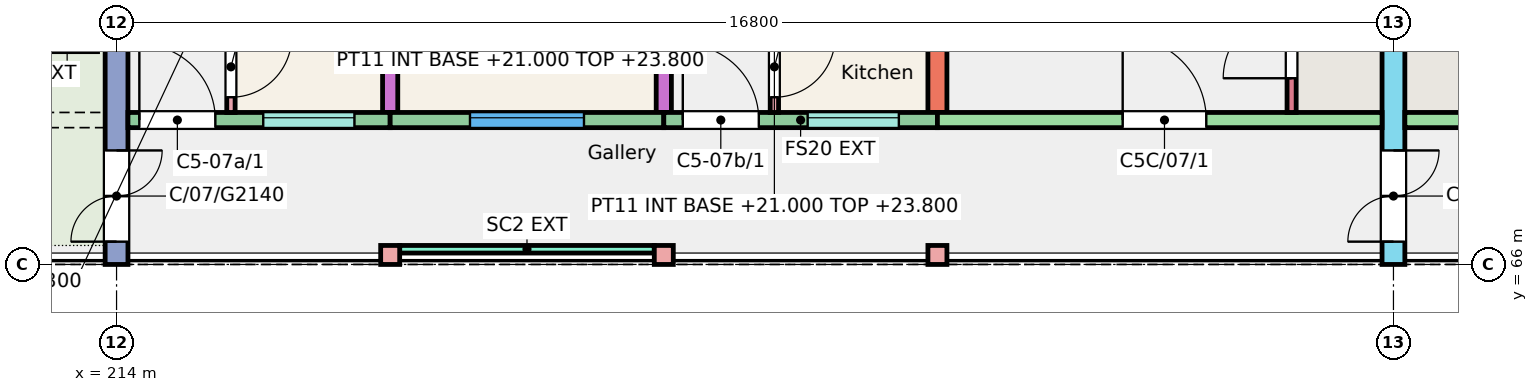
"""IFC4 building model, lengths in metres.
Left out: names, types, materials, properties, quantities, classifications, styles, units other than length and angle.
Written with IfcOpenShell. Run it as: python <this file> out.ifc"""

import sys

from ifc_helpers import new_model, si_unit, direction, frame, frame_2d, origin, origin_2d, place, context, subcontext, project, spatial, rectangle, extrude, element, fill, save


model = new_model("IFC4")
c1 = context("Model", 3, precision=1e-05, world=origin(), true_north=direction((0.0, 1.0)))
c2 = subcontext(c1, "Body", "Model", "MODEL_VIEW")
j1 = project(units=[si_unit("LENGTHUNIT", "METRE"), si_unit("PLANEANGLEUNIT", "RADIAN")], contexts=[c1])
p1 = place(None, origin())
s1 = spatial("IfcSite", under=j1, at=p1, CompositionType="ELEMENT")
p2 = place(p1, origin())
s2 = spatial("IfcBuilding", under=s1, at=p2, CompositionType="ELEMENT")
p3 = place(p2, frame((0.0, 0.0, 21.0)))
s3 = spatial("IfcBuildingStorey", under=s2, at=p3, CompositionType="ELEMENT", Elevation=21.0)
p4 = place(p3, frame((214.0, 66.0, 0.0), z_axis=(0.0, 0.0, 1.0), x_axis=(0.0, 1.0, 0.0)))
e1 = element("IfcWall", 1, at=p4, inside=s3, PredefinedType="SHEAR", context=c2, shape_type="SweptSolid", body=[
    extrude(rectangle(XDim=11.0, YDim=0.3, at=frame_2d((5.5, 0.0))), origin(), (0.0, 0.0, 1.0), 3.0),
])
p5 = place(p4, frame((0.3, 0.0, 0.0)))
e2 = element("IfcOpeningElement", 2, at=p5, cuts=e1, PredefinedType="OPENING", context=c2, shape_type="SweptSolid", body=[
    extrude(rectangle(XDim=1.2, YDim=2.1, at=frame_2d((0.6, 1.05))), frame((0.0, 0.16, 0.0), z_axis=(0.0, -1.0, 0.0), x_axis=(1.0, 0.0, 0.0)), (0.0, 0.0, 1.0), 0.32),
])
p6 = place(p3, frame((217.6, 68.0, 0.0), z_axis=(0.0, 0.0, 1.0), x_axis=(0.0, 1.0, 0.0)))
e3 = element("IfcWall", 3, at=p6, inside=s3, PredefinedType="SHEAR", context=c2, shape_type="SweptSolid", body=[
    extrude(rectangle(XDim=9.0, YDim=0.2, at=frame_2d((4.5, 0.0))), origin(), (0.0, 0.0, 1.0), 3.0),
])
p7 = place(p3, frame((221.2, 68.0, 0.0), z_axis=(0.0, 0.0, 1.0), x_axis=(0.0, 1.0, 0.0)))
e4 = element("IfcWall", 4, at=p7, inside=s3, PredefinedType="SHEAR", context=c2, shape_type="SweptSolid", body=[
    extrude(rectangle(XDim=9.0, YDim=0.2, at=frame_2d((4.5, 0.0))), origin(), (0.0, 0.0, 1.0), 3.0),
])
p8 = place(p7, frame((2.4, 0.0, 0.0)))
e5 = element("IfcOpeningElement", 5, at=p8, cuts=e4, PredefinedType="OPENING", context=c2, shape_type="SweptSolid", body=[
    extrude(rectangle(XDim=1.2, YDim=2.1, at=frame_2d((0.6, 1.05))), frame((0.0, 0.11, 0.0), z_axis=(0.0, -1.0, 0.0), x_axis=(1.0, 0.0, 0.0)), (0.0, 0.0, 1.0), 0.22),
])
p9 = place(p7, frame((6.4, 0.0, 0.0)))
e6 = element("IfcOpeningElement", 6, at=p9, cuts=e4, PredefinedType="OPENING", context=c2, shape_type="SweptSolid", body=[
    extrude(rectangle(XDim=1.2, YDim=2.1, at=frame_2d((0.6, 1.05))), frame((0.0, 0.11, 0.0), z_axis=(0.0, -1.0, 0.0), x_axis=(1.0, 0.0, 0.0)), (0.0, 0.0, 1.0), 0.22),
])
p10 = place(p3, frame((224.8, 68.0, 0.0), z_axis=(0.0, 0.0, 1.0), x_axis=(0.0, 1.0, 0.0)))
e7 = element("IfcWall", 7, at=p10, inside=s3, PredefinedType="SHEAR", context=c2, shape_type="SweptSolid", body=[
    extrude(rectangle(XDim=9.0, YDim=0.25, at=frame_2d((4.5, 0.0))), origin(), (0.0, 0.0, 1.0), 3.0),
])
p11 = place(p3, frame((230.8, 66.0, 0.0), z_axis=(0.0, 0.0, 1.0), x_axis=(0.0, 1.0, 0.0)))
e8 = element("IfcWall", 8, at=p11, inside=s3, PredefinedType="SHEAR", context=c2, shape_type="SweptSolid", body=[
    extrude(rectangle(XDim=11.0, YDim=0.3, at=frame_2d((5.5, 0.0))), origin(), (0.0, 0.0, 1.0), 3.0),
])
p12 = place(p11, frame((0.3, 0.0, 0.0)))
e9 = element("IfcOpeningElement", 9, at=p12, cuts=e8, PredefinedType="OPENING", context=c2, shape_type="SweptSolid", body=[
    extrude(rectangle(XDim=1.2, YDim=2.1, at=frame_2d((0.6, 1.05))), frame((0.0, 0.16, 0.0), z_axis=(0.0, -1.0, 0.0), x_axis=(1.0, 0.0, 0.0)), (0.0, 0.0, 1.0), 0.32),
])
p13 = place(p3, frame((214.15, 67.9, 0.0), z_axis=(0.0, 0.0, 1.0), x_axis=(1.0, 0.0, 0.0)))
e10 = element("IfcWall", 10, at=p13, inside=s3, PredefinedType="SOLIDWALL", context=c2, shape_type="SweptSolid", body=[
    extrude(rectangle(XDim=3.45, YDim=0.2, at=frame_2d((1.725, 0.0))), origin(), (0.0, 0.0, 1.0), 3.0),
])
p14 = place(p13, frame((1.78, 0.0, 1.1)))
e11 = element("IfcOpeningElement", 11, at=p14, cuts=e10, PredefinedType="OPENING", context=c2, shape_type="SweptSolid", body=[
    extrude(rectangle(XDim=1.2, YDim=1.3, at=frame_2d((0.6, 0.65))), frame((0.0, 0.11, 0.0), z_axis=(0.0, -1.0, 0.0), x_axis=(1.0, 0.0, 0.0)), (0.0, 0.0, 1.0), 0.22),
])
p15 = place(p13, frame((0.15, 0.0, 0.0)))
e12 = element("IfcOpeningElement", 12, at=p15, cuts=e10, PredefinedType="OPENING", context=c2, shape_type="SweptSolid", body=[
    extrude(rectangle(XDim=1.0, YDim=2.1, at=frame_2d((0.5, 1.05))), frame((0.0, 0.11, 0.0), z_axis=(0.0, -1.0, 0.0), x_axis=(1.0, 0.0, 0.0)), (0.0, 0.0, 1.0), 0.22),
])
p16 = place(p3, frame((217.6, 67.9, 0.0), z_axis=(0.0, 0.0, 1.0), x_axis=(1.0, 0.0, 0.0)))
e13 = element("IfcWall", 13, at=p16, inside=s3, PredefinedType="SOLIDWALL", context=c2, shape_type="SweptSolid", body=[
    extrude(rectangle(XDim=3.6, YDim=0.2, at=frame_2d((1.8, 0.0))), origin(), (0.0, 0.0, 1.0), 3.0),
])
p17 = place(p16, frame((1.05, 0.0, 0.9)))
e14 = element("IfcOpeningElement", 14, at=p17, cuts=e13, PredefinedType="OPENING", context=c2, shape_type="SweptSolid", body=[
    extrude(rectangle(XDim=1.5, YDim=1.5, at=frame_2d((0.75, 0.75))), frame((0.0, 0.11, 0.0), z_axis=(0.0, -1.0, 0.0), x_axis=(1.0, 0.0, 0.0)), (0.0, 0.0, 1.0), 0.22),
])
p18 = place(p3, frame((221.2, 67.9, 0.0), z_axis=(0.0, 0.0, 1.0), x_axis=(1.0, 0.0, 0.0)))
e15 = element("IfcWall", 15, at=p18, inside=s3, PredefinedType="SOLIDWALL", context=c2, shape_type="SweptSolid", body=[
    extrude(rectangle(XDim=3.6, YDim=0.2, at=frame_2d((1.8, 0.0))), origin(), (0.0, 0.0, 1.0), 3.0),
])
p19 = place(p18, frame((1.893, 0.0, 1.1)))
e16 = element("IfcOpeningElement", 16, at=p19, cuts=e15, PredefinedType="OPENING", context=c2, shape_type="SweptSolid", body=[
    extrude(rectangle(XDim=1.2, YDim=1.3, at=frame_2d((0.6, 0.65))), frame((0.0, 0.11, 0.0), z_axis=(0.0, -1.0, 0.0), x_axis=(1.0, 0.0, 0.0)), (0.0, 0.0, 1.0), 0.22),
])
p20 = place(p18, frame((0.25, 0.0, 0.0)))
e17 = element("IfcOpeningElement", 17, at=p20, cuts=e15, PredefinedType="OPENING", context=c2, shape_type="SweptSolid", body=[
    extrude(rectangle(XDim=1.0, YDim=2.1, at=frame_2d((0.5, 1.05))), frame((0.0, 0.11, 0.0), z_axis=(0.0, -1.0, 0.0), x_axis=(1.0, 0.0, 0.0)), (0.0, 0.0, 1.0), 0.22),
])
p21 = place(p3, frame((224.8, 67.9, 0.0), z_axis=(0.0, 0.0, 1.0), x_axis=(1.0, 0.0, 0.0)))
e18 = element("IfcWall", 18, at=p21, inside=s3, PredefinedType="SHEAR", context=c2, shape_type="SweptSolid", body=[
    extrude(rectangle(XDim=5.85, YDim=0.2, at=frame_2d((2.925, 0.0))), origin(), (0.0, 0.0, 1.0), 3.0),
])
p22 = place(p21, frame((2.438, 0.0, 0.0)))
e19 = element("IfcOpeningElement", 19, at=p22, cuts=e18, PredefinedType="OPENING", context=c2, shape_type="SweptSolid", body=[
    extrude(rectangle(XDim=1.1, YDim=2.1, at=frame_2d((0.55, 1.05))), frame((0.0, 0.11, 0.0), z_axis=(0.0, -1.0, 0.0), x_axis=(1.0, 0.0, 0.0)), (0.0, 0.0, 1.0), 0.22),
])
p23 = place(p3, frame((229.46, 68.0, 0.0), z_axis=(0.0, 0.0, 1.0), x_axis=(0.0, 1.0, 0.0)))
e20 = element("IfcWall", 20, at=p23, inside=s3, PredefinedType="SHEAR", context=c2, shape_type="SweptSolid", body=[
    extrude(rectangle(XDim=1.72, YDim=0.12, at=frame_2d((0.86, 0.0))), origin(), (0.0, 0.0, 1.0), 3.0),
])
p24 = place(p23, frame((0.45, 0.0, 0.0)))
e21 = element("IfcOpeningElement", 21, at=p24, cuts=e20, PredefinedType="OPENING", context=c2, shape_type="SweptSolid", body=[
    extrude(rectangle(XDim=0.9, YDim=2.1, at=frame_2d((0.45, 1.05))), frame((0.0, 0.07, 0.0), z_axis=(0.0, -1.0, 0.0), x_axis=(1.0, 0.0, 0.0)), (0.0, 0.0, 1.0), 0.14),
])
p25 = place(p3, frame((230.95, 67.9, 0.0), z_axis=(0.0, 0.0, 1.0), x_axis=(1.0, 0.0, 0.0)))
e22 = element("IfcWall", 22, at=p25, inside=s3, PredefinedType="SHEAR", context=c2, shape_type="SweptSolid", body=[
    extrude(rectangle(XDim=5.85, YDim=0.2, at=frame_2d((2.925, 0.0))), origin(), (0.0, 0.0, 1.0), 3.0),
])
p26 = place(p25, frame((2.312, 0.0, 0.0)))
e23 = element("IfcOpeningElement", 23, at=p26, cuts=e22, PredefinedType="OPENING", context=c2, shape_type="SweptSolid", body=[
    extrude(rectangle(XDim=1.1, YDim=2.1, at=frame_2d((0.55, 1.05))), frame((0.0, 0.11, 0.0), z_axis=(0.0, -1.0, 0.0), x_axis=(1.0, 0.0, 0.0)), (0.0, 0.0, 1.0), 0.22),
])
for number, where, z_axis, x_axis in (
    (24, (217.6, 66.125, 0.0), (0.0, 0.0, 1.0), (1.0, 0.0, 0.0)),
    (25, (221.2, 66.125, 0.0), (0.0, 0.0, 1.0), (1.0, 0.0, 0.0)),
    (26, (224.8, 66.125, 0.0), (0.0, 0.0, 1.0), (1.0, 0.0, 0.0)),
):
    element("IfcColumn", number, at=place(p3, frame(where, z_axis=z_axis, x_axis=x_axis)), inside=s3, PredefinedType="COLUMN", context=c2, shape_type="SweptSolid", body=[
        extrude(rectangle(XDim=0.25, YDim=0.25, at=origin_2d()), origin(), (0.0, 0.0, 1.0), 3.0),
    ])
p27 = place(p3, frame((212.95, 68.9, 0.01), z_axis=(0.0, 0.0, 1.0), x_axis=(1.0, 0.0, 0.0)))
e27 = element("IfcWall", 27, at=p27, inside=s3, PredefinedType="SOLIDWALL", context=c2, shape_type="SweptSolid", body=[
    extrude(rectangle(XDim=0.8, YDim=0.2, at=frame_2d((0.4, 0.0))), origin(), (0.0, 0.0, 1.0), 0.45),
])
p28 = place(p3, frame((217.725, 66.2, 0.0), z_axis=(0.0, 0.0, 1.0), x_axis=(1.0, 0.0, 0.0)))
e28 = element("IfcWall", 28, at=p28, inside=s3, PredefinedType="SOLIDWALL", context=c2, shape_type="SweptSolid", body=[
    extrude(rectangle(XDim=3.35, YDim=0.1, at=frame_2d((1.675, 0.0))), origin(), (0.0, 0.0, 1.0), 2.45),
])
p29 = place(p3, frame((215.505, 68.0, 0.0), z_axis=(0.0, 0.0, 1.0), x_axis=(0.0, 1.0, 0.0)))
e29 = element("IfcWall", 29, at=p29, inside=s3, PredefinedType="PARTITIONING", context=c2, shape_type="SweptSolid", body=[
    extrude(rectangle(XDim=4.3, YDim=0.11, at=frame_2d((2.15, 0.0))), origin(), (0.0, 0.0, 1.0), 2.8),
])
p30 = place(p29, frame((0.2, 0.0, 0.0)))
e30 = element("IfcOpeningElement", 30, at=p30, cuts=e29, PredefinedType="OPENING", context=c2, shape_type="SweptSolid", body=[
    extrude(rectangle(XDim=0.8, YDim=2.1, at=frame_2d((0.4, 1.05))), frame((0.0, 0.065, 0.0), z_axis=(0.0, -1.0, 0.0), x_axis=(1.0, 0.0, 0.0)), (0.0, 0.0, 1.0), 0.13),
])
p31 = place(p29, frame((3.35, 0.0, 0.0)))
e31 = element("IfcOpeningElement", 31, at=p31, cuts=e29, PredefinedType="OPENING", context=c2, shape_type="SweptSolid", body=[
    extrude(rectangle(XDim=0.8, YDim=2.1, at=frame_2d((0.4, 1.05))), frame((0.0, 0.065, 0.0), z_axis=(0.0, -1.0, 0.0), x_axis=(1.0, 0.0, 0.0)), (0.0, 0.0, 1.0), 0.13),
])
p32 = place(p3, frame((222.655, 68.0, 0.0), z_axis=(0.0, 0.0, 1.0), x_axis=(0.0, 1.0, 0.0)))
e32 = element("IfcWall", 32, at=p32, inside=s3, PredefinedType="PARTITIONING", context=c2, shape_type="SweptSolid", body=[
    extrude(rectangle(XDim=4.3, YDim=0.11, at=frame_2d((2.15, 0.0))), origin(), (0.0, 0.0, 1.0), 2.8),
])
p33 = place(p32, frame((0.2, 0.0, 0.0)))
e33 = element("IfcOpeningElement", 33, at=p33, cuts=e32, PredefinedType="OPENING", context=c2, shape_type="SweptSolid", body=[
    extrude(rectangle(XDim=0.8, YDim=2.1, at=frame_2d((0.4, 1.05))), frame((0.0, 0.065, 0.0), z_axis=(0.0, -1.0, 0.0), x_axis=(1.0, 0.0, 0.0)), (0.0, 0.0, 1.0), 0.13),
])
p34 = place(p32, frame((3.35, 0.0, 0.0)))
e34 = element("IfcOpeningElement", 34, at=p34, cuts=e32, PredefinedType="OPENING", context=c2, shape_type="SweptSolid", body=[
    extrude(rectangle(XDim=0.8, YDim=2.1, at=frame_2d((0.4, 1.05))), frame((0.0, 0.065, 0.0), z_axis=(0.0, -1.0, 0.0), x_axis=(1.0, 0.0, 0.0)), (0.0, 0.0, 1.0), 0.13),
])
p35 = place(p14, origin())
e35 = element("IfcWindow", 35, at=p35, inside=s3, PartitioningType="SINGLE_PANEL", PredefinedType="WINDOW", context=c2, shape_type="SweptSolid", body=[
    extrude(rectangle(XDim=1.2, YDim=1.3, at=frame_2d((0.6, 0.65))), frame((0.0, 0.06, 0.0), z_axis=(0.0, -1.0, 0.0), x_axis=(1.0, 0.0, 0.0)), (0.0, 0.0, 1.0), 0.06),
])
fill(e11, e35)
p36 = place(p17, origin())
e36 = element("IfcWindow", 36, at=p36, inside=s3, PartitioningType="SINGLE_PANEL", PredefinedType="WINDOW", context=c2, shape_type="SweptSolid", body=[
    extrude(rectangle(XDim=1.5, YDim=1.5, at=frame_2d((0.75, 0.75))), frame((0.0, 0.06, 0.0), z_axis=(0.0, -1.0, 0.0), x_axis=(1.0, 0.0, 0.0)), (0.0, 0.0, 1.0), 0.06),
])
fill(e14, e36)
p37 = place(p19, origin())
e37 = element("IfcWindow", 37, at=p37, inside=s3, PartitioningType="SINGLE_PANEL", PredefinedType="WINDOW", context=c2, shape_type="SweptSolid", body=[
    extrude(rectangle(XDim=1.2, YDim=1.3, at=frame_2d((0.6, 0.65))), frame((0.0, 0.06, 0.0), z_axis=(0.0, -1.0, 0.0), x_axis=(1.0, 0.0, 0.0)), (0.0, 0.0, 1.0), 0.06),
])
fill(e16, e37)
p38 = place(p15, origin())
e38 = element("IfcDoor", 38, at=p38, inside=s3, OperationType="SINGLE_SWING_LEFT", PredefinedType="DOOR", context=c2, shape_type="SweptSolid", body=[
    extrude(rectangle(XDim=1.0, YDim=2.1, at=frame_2d((0.5, 1.05))), frame((0.0, 0.025, 0.0), z_axis=(0.0, -1.0, 0.0), x_axis=(1.0, 0.0, 0.0)), (0.0, 0.0, 1.0), 0.05),
])
fill(e12, e38)
p39 = place(p30, origin())
e39 = element("IfcDoor", 39, at=p39, inside=s3, OperationType="SINGLE_SWING_RIGHT", PredefinedType="DOOR", context=c2, shape_type="SweptSolid", body=[
    extrude(rectangle(XDim=0.8, YDim=2.1, at=frame_2d((0.4, 1.05))), frame((0.0, 0.025, 0.0), z_axis=(0.0, -1.0, 0.0), x_axis=(1.0, 0.0, 0.0)), (0.0, 0.0, 1.0), 0.05),
])
fill(e30, e39)
p40 = place(p20, origin())
e40 = element("IfcDoor", 40, at=p40, inside=s3, OperationType="SINGLE_SWING_LEFT", PredefinedType="DOOR", context=c2, shape_type="SweptSolid", body=[
    extrude(rectangle(XDim=1.0, YDim=2.1, at=frame_2d((0.5, 1.05))), frame((0.0, 0.025, 0.0), z_axis=(0.0, -1.0, 0.0), x_axis=(1.0, 0.0, 0.0)), (0.0, 0.0, 1.0), 0.05),
])
fill(e17, e40)
p41 = place(p33, origin())
e41 = element("IfcDoor", 41, at=p41, inside=s3, OperationType="SINGLE_SWING_RIGHT", PredefinedType="DOOR", context=c2, shape_type="SweptSolid", body=[
    extrude(rectangle(XDim=0.8, YDim=2.1, at=frame_2d((0.4, 1.05))), frame((0.0, 0.025, 0.0), z_axis=(0.0, -1.0, 0.0), x_axis=(1.0, 0.0, 0.0)), (0.0, 0.0, 1.0), 0.05),
])
fill(e33, e41)
p42 = place(p22, origin())
e42 = element("IfcDoor", 42, at=p42, inside=s3, OperationType="SINGLE_SWING_LEFT", PredefinedType="DOOR", context=c2, shape_type="SweptSolid", body=[
    extrude(rectangle(XDim=1.1, YDim=2.1, at=frame_2d((0.55, 1.05))), frame((0.0, 0.025, 0.0), z_axis=(0.0, -1.0, 0.0), x_axis=(1.0, 0.0, 0.0)), (0.0, 0.0, 1.0), 0.05),
])
fill(e19, e42)
p43 = place(p24, origin())
e43 = element("IfcDoor", 43, at=p43, inside=s3, OperationType="SINGLE_SWING_LEFT", PredefinedType="DOOR", context=c2, shape_type="SweptSolid", body=[
    extrude(rectangle(XDim=0.9, YDim=2.1, at=frame_2d((0.45, 1.05))), frame((0.0, 0.025, 0.0), z_axis=(0.0, -1.0, 0.0), x_axis=(1.0, 0.0, 0.0)), (0.0, 0.0, 1.0), 0.05),
])
fill(e21, e43)
p44 = place(p5, origin())
e44 = element("IfcDoor", 44, at=p44, inside=s3, OperationType="DOUBLE_DOOR_SINGLE_SWING", PredefinedType="DOOR", context=c2, shape_type="SweptSolid", body=[
    extrude(rectangle(XDim=1.2, YDim=2.1, at=frame_2d((0.6, 1.05))), frame((0.0, 0.025, 0.0), z_axis=(0.0, -1.0, 0.0), x_axis=(1.0, 0.0, 0.0)), (0.0, 0.0, 1.0), 0.05),
])
fill(e2, e44)
p45 = place(p12, origin())
e45 = element("IfcDoor", 45, at=p45, inside=s3, OperationType="DOUBLE_DOOR_SINGLE_SWING", PredefinedType="DOOR", context=c2, shape_type="SweptSolid", body=[
    extrude(rectangle(XDim=1.2, YDim=2.1, at=frame_2d((0.6, 1.05))), frame((0.0, 0.025, 0.0), z_axis=(0.0, -1.0, 0.0), x_axis=(1.0, 0.0, 0.0)), (0.0, 0.0, 1.0), 0.05),
])
fill(e9, e45)
save(model, sys.argv[1])
